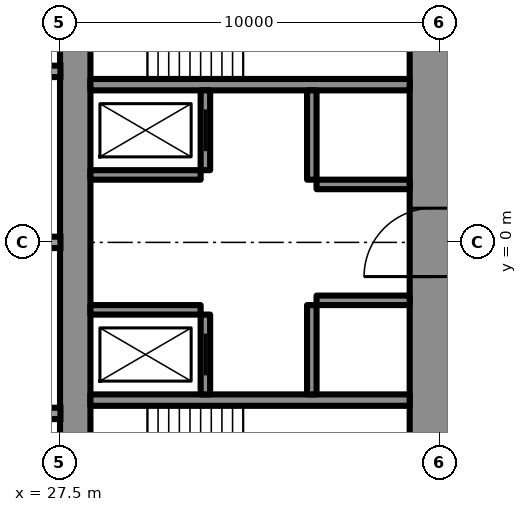
"""IFC4 building model, lengths in metres.
Left out: names, types, materials, properties, quantities, classifications, styles, units other than length and angle.
Written with IfcOpenShell. Run it as: python <this file> out.ifc"""

import sys

from ifc_helpers import new_model, si_unit, direction, frame, frame_2d, origin, place, context, subcontext, project, spatial, rectangle, extrude, element, fill, save


model = new_model("IFC4")
c1 = context("Model", 3, precision=1e-05, world=origin(), true_north=direction((0.0, 1.0)))
c2 = subcontext(c1, "Body", "Model", "MODEL_VIEW")
j1 = project(units=[si_unit("LENGTHUNIT", "METRE"), si_unit("PLANEANGLEUNIT", "RADIAN")], contexts=[c1])
p1 = place(None, origin())
s1 = spatial("IfcSite", under=j1, at=p1, CompositionType="ELEMENT")
p2 = place(p1, origin())
s2 = spatial("IfcBuilding", under=s1, at=p2, CompositionType="ELEMENT")
p3 = place(p2, frame((0.0, 0.0, 180.8)))
s3 = spatial("IfcBuildingStorey", under=s2, at=p3, CompositionType="ELEMENT", Elevation=180.8)
p4 = place(p3, frame((27.9, -8.6, 0.0), z_axis=(0.0, 0.0, 1.0), x_axis=(0.0, 1.0, 0.0)))
e1 = element("IfcWall", 1, at=p4, inside=s3, PredefinedType="SHEAR", context=c2, shape_type="SweptSolid", body=[
    extrude(rectangle(XDim=17.2, YDim=0.8, at=frame_2d((8.6, 0.0))), origin(), (0.0, 0.0, 1.0), 3.5),
])
p5 = place(p4, frame((2.45, 0.0, 0.6)))
e2 = element("IfcOpeningElement", 2, at=p5, cuts=e1, PredefinedType="OPENING", context=c2, shape_type="SweptSolid", body=[
    extrude(rectangle(XDim=0.6, YDim=2.1, at=frame_2d((0.3, 1.05))), frame((0.0, 0.41, 0.0), z_axis=(0.0, -1.0, 0.0), x_axis=(1.0, 0.0, 0.0)), (0.0, 0.0, 1.0), 0.82),
])
p6 = place(p4, frame((14.15, 0.0, 0.6)))
e3 = element("IfcOpeningElement", 3, at=p6, cuts=e1, PredefinedType="OPENING", context=c2, shape_type="SweptSolid", body=[
    extrude(rectangle(XDim=0.6, YDim=2.1, at=frame_2d((0.3, 1.05))), frame((0.0, 0.41, 0.0), z_axis=(0.0, -1.0, 0.0), x_axis=(1.0, 0.0, 0.0)), (0.0, 0.0, 1.0), 0.82),
])
p7 = place(p3, frame((37.3, -8.6, 0.0), z_axis=(0.0, 0.0, 1.0), x_axis=(0.0, 1.0, 0.0)))
e4 = element("IfcWall", 4, at=p7, inside=s3, PredefinedType="SHEAR", context=c2, shape_type="SweptSolid", body=[
    extrude(rectangle(XDim=17.2, YDim=1.2, at=frame_2d((8.6, 0.0))), origin(), (0.0, 0.0, 1.0), 3.5),
])
p8 = place(p7, frame((7.7, 0.0, 0.0)))
e5 = element("IfcOpeningElement", 5, at=p8, cuts=e4, PredefinedType="OPENING", context=c2, shape_type="SweptSolid", body=[
    extrude(rectangle(XDim=1.8, YDim=2.2, at=frame_2d((0.9, 1.1))), frame((0.0, 0.61, 0.0), z_axis=(0.0, -1.0, 0.0), x_axis=(1.0, 0.0, 0.0)), (0.0, 0.0, 1.0), 1.22),
])
for number, where, z_axis, x_axis in (
    (6, (28.3, -4.15, 0.0), (0.0, 0.0, 1.0), (1.0, 0.0, 0.0)),
    (7, (28.3, 4.15, 0.0), (0.0, 0.0, 1.0), (1.0, 0.0, 0.0)),
):
    element("IfcWall", number, at=place(p3, frame(where, z_axis=z_axis, x_axis=x_axis)), inside=s3, PredefinedType="SHEAR", context=c2, shape_type="SweptSolid", body=[
        extrude(rectangle(XDim=8.4, YDim=0.3, at=frame_2d((4.2, 0.0))), origin(), (0.0, 0.0, 1.0), 3.5),
    ])
p9 = place(p3, frame((31.325, -4.0, 0.0), z_axis=(0.0, 0.0, 1.0), x_axis=(0.0, 1.0, 0.0)))
e8 = element("IfcWall", 8, at=p9, inside=s3, PredefinedType="SHEAR", context=c2, shape_type="SweptSolid", body=[
    extrude(rectangle(XDim=2.1, YDim=0.25, at=frame_2d((1.05, 0.0))), origin(), (0.0, 0.0, 1.0), 3.5),
])
p10 = place(p9, frame((0.5, 0.0, 0.0)))
e9 = element("IfcOpeningElement", 9, at=p10, cuts=e8, PredefinedType="OPENING", context=c2, shape_type="SweptSolid", body=[
    extrude(rectangle(XDim=1.1, YDim=2.2, at=frame_2d((0.55, 1.1))), frame((0.0, 0.135, 0.0), z_axis=(0.0, -1.0, 0.0), x_axis=(1.0, 0.0, 0.0)), (0.0, 0.0, 1.0), 0.27),
])
p11 = place(p3, frame((34.125, -4.0, 0.0), z_axis=(0.0, 0.0, 1.0), x_axis=(0.0, 1.0, 0.0)))
e10 = element("IfcWall", 10, at=p11, inside=s3, PredefinedType="SHEAR", context=c2, shape_type="SweptSolid", body=[
    extrude(rectangle(XDim=2.35, YDim=0.25, at=frame_2d((1.175, 0.0))), origin(), (0.0, 0.0, 1.0), 3.5),
])
p12 = place(p3, frame((28.3, -1.775, 0.0), z_axis=(0.0, 0.0, 1.0), x_axis=(1.0, 0.0, 0.0)))
e11 = element("IfcWall", 11, at=p12, inside=s3, PredefinedType="SHEAR", context=c2, shape_type="SweptSolid", body=[
    extrude(rectangle(XDim=2.9, YDim=0.25, at=frame_2d((1.45, 0.0))), origin(), (0.0, 0.0, 1.0), 3.5),
])
p13 = place(p3, frame((34.25, -1.525, 0.0), z_axis=(0.0, 0.0, 1.0), x_axis=(1.0, 0.0, 0.0)))
e12 = element("IfcWall", 12, at=p13, inside=s3, PredefinedType="SHEAR", context=c2, shape_type="SweptSolid", body=[
    extrude(rectangle(XDim=2.45, YDim=0.25, at=frame_2d((1.225, 0.0))), origin(), (0.0, 0.0, 1.0), 3.5),
])
p14 = place(p3, frame((31.325, 1.9, 0.0), z_axis=(0.0, 0.0, 1.0), x_axis=(0.0, 1.0, 0.0)))
e13 = element("IfcWall", 13, at=p14, inside=s3, PredefinedType="SHEAR", context=c2, shape_type="SweptSolid", body=[
    extrude(rectangle(XDim=2.1, YDim=0.25, at=frame_2d((1.05, 0.0))), origin(), (0.0, 0.0, 1.0), 3.5),
])
p15 = place(p14, frame((0.5, 0.0, 0.0)))
e14 = element("IfcOpeningElement", 14, at=p15, cuts=e13, PredefinedType="OPENING", context=c2, shape_type="SweptSolid", body=[
    extrude(rectangle(XDim=1.1, YDim=2.2, at=frame_2d((0.55, 1.1))), frame((0.0, 0.135, 0.0), z_axis=(0.0, -1.0, 0.0), x_axis=(1.0, 0.0, 0.0)), (0.0, 0.0, 1.0), 0.27),
])
p16 = place(p3, frame((34.125, 1.65, 0.0), z_axis=(0.0, 0.0, 1.0), x_axis=(0.0, 1.0, 0.0)))
e15 = element("IfcWall", 15, at=p16, inside=s3, PredefinedType="SHEAR", context=c2, shape_type="SweptSolid", body=[
    extrude(rectangle(XDim=2.35, YDim=0.25, at=frame_2d((1.175, 0.0))), origin(), (0.0, 0.0, 1.0), 3.5),
])
p17 = place(p3, frame((28.3, 1.775, 0.0), z_axis=(0.0, 0.0, 1.0), x_axis=(1.0, 0.0, 0.0)))
e16 = element("IfcWall", 16, at=p17, inside=s3, PredefinedType="SHEAR", context=c2, shape_type="SweptSolid", body=[
    extrude(rectangle(XDim=2.9, YDim=0.25, at=frame_2d((1.45, 0.0))), origin(), (0.0, 0.0, 1.0), 3.5),
])
p18 = place(p3, frame((34.25, 1.525, 0.0), z_axis=(0.0, 0.0, 1.0), x_axis=(1.0, 0.0, 0.0)))
e17 = element("IfcWall", 17, at=p18, inside=s3, PredefinedType="SHEAR", context=c2, shape_type="SweptSolid", body=[
    extrude(rectangle(XDim=2.45, YDim=0.25, at=frame_2d((1.225, 0.0))), origin(), (0.0, 0.0, 1.0), 3.5),
])
p19 = place(p3, frame((27.2, -13.8, 0.0), z_axis=(0.0, 0.0, 1.0), x_axis=(0.866027159892, 0.499996958321, 0.0)))
e18 = element("IfcWall", 18, at=p19, inside=s3, PredefinedType="SHEAR", context=c2, shape_type="SweptSolid", body=[
    extrude(rectangle(XDim=27.947, YDim=1.2, at=frame_2d((13.973, 0.0))), origin(), (0.0, 0.0, 1.0), 3.5),
])
p20 = place(p19, frame((4.6, 0.0, 0.0)))
e19 = element("IfcOpeningElement", 19, at=p20, cuts=e18, PredefinedType="OPENING", context=c2, shape_type="SweptSolid", body=[
    extrude(rectangle(XDim=1.0, YDim=2.2, at=frame_2d((0.5, 1.1))), frame((0.0, 0.61, 0.0), z_axis=(0.0, -1.0, 0.0), x_axis=(1.0, 0.0, 0.0)), (0.0, 0.0, 1.0), 1.22),
])
p21 = place(p19, frame((13.395, 0.0, 0.0)))
e20 = element("IfcOpeningElement", 20, at=p21, cuts=e18, PredefinedType="OPENING", context=c2, shape_type="SweptSolid", body=[
    extrude(rectangle(XDim=1.8, YDim=2.2, at=frame_2d((0.9, 1.1))), frame((0.0, 0.61, 0.0), z_axis=(0.0, -1.0, 0.0), x_axis=(1.0, 0.0, 0.0)), (0.0, 0.0, 1.0), 1.22),
])
p22 = place(p3, frame((27.2, 13.8, 0.0), z_axis=(0.0, 0.0, 1.0), x_axis=(0.866024515034, -0.500001539357, 0.0)))
e21 = element("IfcWall", 21, at=p22, inside=s3, PredefinedType="SHEAR", context=c2, shape_type="SweptSolid", body=[
    extrude(rectangle(XDim=26.907, YDim=1.2, at=frame_2d((13.454, 0.0))), origin(), (0.0, 0.0, 1.0), 3.5),
])
p23 = place(p22, frame((4.6, 0.0, 0.0)))
e22 = element("IfcOpeningElement", 22, at=p23, cuts=e21, PredefinedType="OPENING", context=c2, shape_type="SweptSolid", body=[
    extrude(rectangle(XDim=1.0, YDim=2.2, at=frame_2d((0.5, 1.1))), frame((0.0, 0.61, 0.0), z_axis=(0.0, -1.0, 0.0), x_axis=(1.0, 0.0, 0.0)), (0.0, 0.0, 1.0), 1.22),
])
p24 = place(p22, frame((13.395, 0.0, 0.0)))
e23 = element("IfcOpeningElement", 23, at=p24, cuts=e21, PredefinedType="OPENING", context=c2, shape_type="SweptSolid", body=[
    extrude(rectangle(XDim=1.8, YDim=2.2, at=frame_2d((0.9, 1.1))), frame((0.0, 0.61, 0.0), z_axis=(0.0, -1.0, 0.0), x_axis=(1.0, 0.0, 0.0)), (0.0, 0.0, 1.0), 1.22),
])
p25 = place(p3, frame((27.959, -16.017, 0.0), z_axis=(0.0, 0.0, 1.0), x_axis=(0.866024180982, 0.50000211795, 0.0)))
e24 = element("IfcWall", 24, at=p25, inside=s3, PredefinedType="PARTITIONING", context=c2, shape_type="SweptSolid", body=[
    extrude(rectangle(XDim=23.375, YDim=0.2, at=frame_2d((11.688, 0.0))), origin(), (0.0, 0.0, 1.0), 3.25),
])
p26 = place(p25, frame((2.415, 0.0, 0.0)))
e25 = element("IfcOpeningElement", 25, at=p26, cuts=e24, PredefinedType="OPENING", context=c2, shape_type="SweptSolid", body=[
    extrude(rectangle(XDim=0.95, YDim=2.2, at=frame_2d((0.475, 1.1))), frame((0.0, 0.11, 0.0), z_axis=(0.0, -1.0, 0.0), x_axis=(1.0, 0.0, 0.0)), (0.0, 0.0, 1.0), 0.22),
])
p27 = place(p25, frame((9.215, 0.0, 0.0)))
e26 = element("IfcOpeningElement", 26, at=p27, cuts=e24, PredefinedType="OPENING", context=c2, shape_type="SweptSolid", body=[
    extrude(rectangle(XDim=1.0, YDim=2.2, at=frame_2d((0.5, 1.1))), frame((0.0, 0.11, 0.0), z_axis=(0.0, -1.0, 0.0), x_axis=(1.0, 0.0, 0.0)), (0.0, 0.0, 1.0), 0.22),
])
p28 = place(p25, frame((15.109, 0.0, 0.0)))
e27 = element("IfcOpeningElement", 27, at=p28, cuts=e24, PredefinedType="OPENING", context=c2, shape_type="SweptSolid", body=[
    extrude(rectangle(XDim=0.95, YDim=2.2, at=frame_2d((0.475, 1.1))), frame((0.0, 0.11, 0.0), z_axis=(0.0, -1.0, 0.0), x_axis=(1.0, 0.0, 0.0)), (0.0, 0.0, 1.0), 0.22),
])
p29 = place(p8, origin())
e28 = element("IfcDoor", 28, at=p29, inside=s3, OperationType="DOUBLE_DOOR_SINGLE_SWING", PredefinedType="DOOR", context=c2, shape_type="SweptSolid", body=[
    extrude(rectangle(XDim=1.8, YDim=2.2, at=frame_2d((0.9, 1.1))), frame((0.0, 0.025, 0.0), z_axis=(0.0, -1.0, 0.0), x_axis=(1.0, 0.0, 0.0)), (0.0, 0.0, 1.0), 0.05),
])
fill(e5, e28)
p30 = place(p10, origin())
e29 = element("IfcDoor", 29, at=p30, inside=s3, OperationType="SLIDING_TO_LEFT", PredefinedType="USERDEFINED", context=c2, shape_type="SweptSolid", body=[
    extrude(rectangle(XDim=1.1, YDim=2.2, at=frame_2d((0.55, 1.1))), frame((0.0, 0.025, 0.0), z_axis=(0.0, -1.0, 0.0), x_axis=(1.0, 0.0, 0.0)), (0.0, 0.0, 1.0), 0.05),
])
fill(e9, e29)
p31 = place(p15, origin())
e30 = element("IfcDoor", 30, at=p31, inside=s3, OperationType="SLIDING_TO_LEFT", PredefinedType="USERDEFINED", context=c2, shape_type="SweptSolid", body=[
    extrude(rectangle(XDim=1.1, YDim=2.2, at=frame_2d((0.55, 1.1))), frame((0.0, 0.025, 0.0), z_axis=(0.0, -1.0, 0.0), x_axis=(1.0, 0.0, 0.0)), (0.0, 0.0, 1.0), 0.05),
])
fill(e14, e30)
save(model, sys.argv[1])
